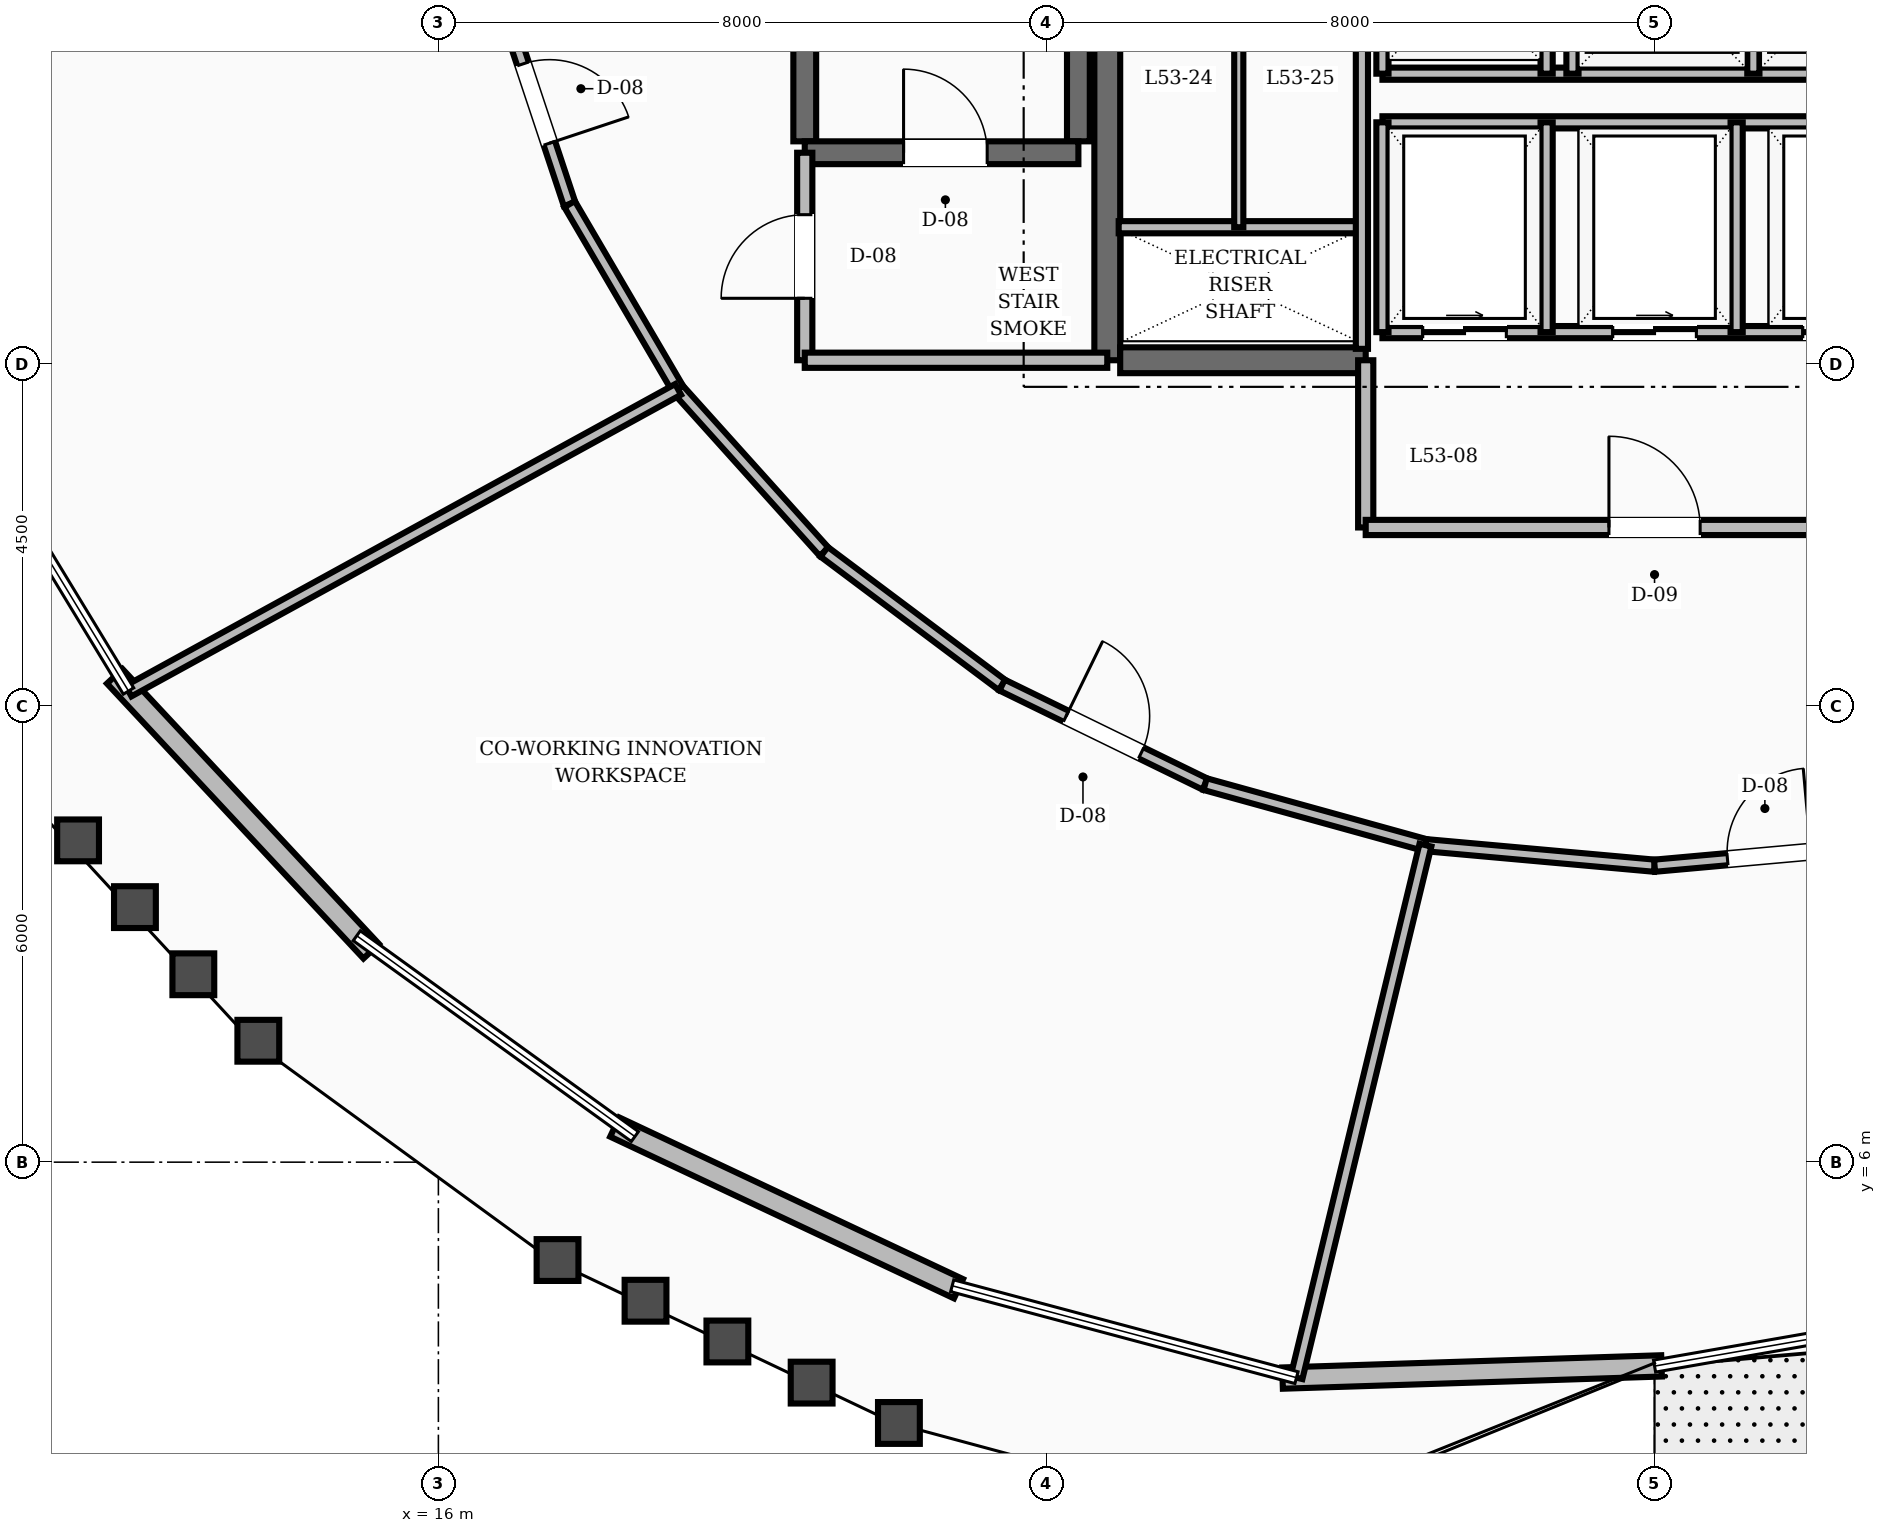
"""IFC4 building model, lengths in metres.
Left out: names, types, materials, properties, quantities, classifications, styles, units other than length and angle.
Written with IfcOpenShell. Run it as: python <this file> out.ifc"""

import sys

from ifc_helpers import new_model, si_unit, direction, frame, frame_2d, origin, place, context, subcontext, project, spatial, rectangle, extrude, element, fill, save


model = new_model("IFC4")
c1 = context("Model", 3, precision=1e-05, world=origin(), true_north=direction((0.0, 1.0)))
c2 = subcontext(c1, "Body", "Model", "MODEL_VIEW")
j1 = project(units=[si_unit("LENGTHUNIT", "METRE"), si_unit("PLANEANGLEUNIT", "RADIAN")], contexts=[c1])
p1 = place(None, origin())
s1 = spatial("IfcSite", under=j1, at=p1, CompositionType="ELEMENT")
p2 = place(p1, origin())
s2 = spatial("IfcBuilding", under=s1, at=p2, CompositionType="ELEMENT")
p3 = place(p2, frame((0.0, 0.0, 203.6)))
s3 = spatial("IfcBuildingStorey", under=s2, at=p3, CompositionType="ELEMENT", Elevation=203.6)
p4 = place(p3, frame((24.8, 16.55, 0.0), z_axis=(0.0, 0.0, 1.0), x_axis=(0.0, 1.0, 0.0)))
e1 = element("IfcWall", 1, at=p4, inside=s3, PredefinedType="SHEAR", context=c2, shape_type="SweptSolid", body=[
    extrude(rectangle(XDim=6.3, YDim=0.34, at=frame_2d((3.15, 0.0))), origin(), (0.0, 0.0, 1.0), 4.8),
])
p5 = place(p3, frame((24.97, 16.55, 0.0), z_axis=(0.0, 0.0, 1.0), x_axis=(1.0, 0.0, 0.0)))
e2 = element("IfcWall", 2, at=p5, inside=s3, PredefinedType="SHEAR", context=c2, shape_type="SweptSolid", body=[
    extrude(rectangle(XDim=3.23, YDim=0.34, at=frame_2d((1.615, 0.0))), origin(), (0.0, 0.0, 1.0), 4.8),
])
for number, where, z_axis, x_axis in (
    (3, (20.82, 19.43, 0.0), (0.0, 0.0, 1.0), (0.0, 1.0, 0.0)),
    (4, (24.42, 19.43, 0.0), (0.0, 0.0, 1.0), (0.0, 1.0, 0.0)),
):
    element("IfcWall", number, at=place(p3, frame(where, z_axis=z_axis, x_axis=x_axis)), inside=s3, PredefinedType="SHEAR", context=c2, shape_type="SweptSolid", body=[
        extrude(rectangle(XDim=8.74, YDim=0.3, at=frame_2d((4.37, 0.0))), origin(), (0.0, 0.0, 1.0), 4.8),
    ])
p6 = place(p3, frame((20.82, 19.28, 0.0), z_axis=(0.0, 0.0, 1.0), x_axis=(1.0, 0.0, 0.0)))
e5 = element("IfcWall", 5, at=p6, inside=s3, PredefinedType="SHEAR", context=c2, shape_type="SweptSolid", body=[
    extrude(rectangle(XDim=3.6, YDim=0.3, at=frame_2d((1.8, 0.0))), origin(), (0.0, 0.0, 1.0), 4.8),
])
p7 = place(p6, frame((1.3, 0.0, 0.0)))
e6 = element("IfcOpeningElement", 6, at=p7, cuts=e5, PredefinedType="OPENING", context=c2, shape_type="SweptSolid", body=[
    extrude(rectangle(XDim=1.1, YDim=2.1, at=frame_2d((0.55, 1.05))), frame((0.0, 0.16, 0.0), z_axis=(0.0, -1.0, 0.0), x_axis=(1.0, 0.0, 0.0)), (0.0, 0.0, 1.0), 0.32),
])
p8 = place(p3, frame((11.742, 12.392, 0.0), z_axis=(0.0, 0.0, 1.0), x_axis=(0.682128325962, -0.731232484864, 0.0)))
e7 = element("IfcWall", 7, at=p8, inside=s3, PredefinedType="STANDARD", context=c2, shape_type="SweptSolid", body=[
    extrude(rectangle(XDim=4.947, YDim=0.28, at=frame_2d((2.474, 0.0))), origin(), (0.0, 0.0, 1.0), 3.71),
])
p9 = place(p3, frame((18.32, 6.462, 0.0), z_axis=(0.0, 0.0, 1.0), x_axis=(0.904923833453, -0.425573560796, 0.0)))
e8 = element("IfcWall", 8, at=p9, inside=s3, PredefinedType="STANDARD", context=c2, shape_type="SweptSolid", body=[
    extrude(rectangle(XDim=4.999, YDim=0.28, at=frame_2d((2.499, 0.0))), origin(), (0.0, 0.0, 1.0), 3.71),
])
p10 = place(p3, frame((27.105, 3.159, 0.0), z_axis=(0.0, 0.0, 1.0), x_axis=(0.999479910851, 0.03224760153, 0.0)))
e9 = element("IfcWall", 9, at=p10, inside=s3, PredefinedType="STANDARD", context=c2, shape_type="SweptSolid", body=[
    extrude(rectangle(XDim=4.989, YDim=0.28, at=frame_2d((2.495, 0.0))), origin(), (0.0, 0.0, 1.0), 3.71),
])
p11 = place(p3, frame((20.82, 16.55, 0.0), z_axis=(0.0, 0.0, 1.0), x_axis=(0.0, 1.0, 0.0)))
e10 = element("IfcWall", 10, at=p11, inside=s3, PredefinedType="SOLIDWALL", context=c2, shape_type="SweptSolid", body=[
    extrude(rectangle(XDim=2.73, YDim=0.2, at=frame_2d((1.365, 0.0))), origin(), (0.0, 0.0, 1.0), 3.71),
])
p12 = place(p11, frame((0.815, 0.0, 0.0)))
e11 = element("IfcOpeningElement", 11, at=p12, cuts=e10, PredefinedType="OPENING", context=c2, shape_type="SweptSolid", body=[
    extrude(rectangle(XDim=1.1, YDim=2.1, at=frame_2d((0.55, 1.05))), frame((0.0, 0.11, 0.0), z_axis=(0.0, -1.0, 0.0), x_axis=(1.0, 0.0, 0.0)), (0.0, 0.0, 1.0), 0.22),
])
p13 = place(p3, frame((20.82, 16.55, 0.0), z_axis=(0.0, 0.0, 1.0), x_axis=(1.0, 0.0, 0.0)))
e12 = element("IfcWall", 12, at=p13, inside=s3, PredefinedType="SOLIDWALL", context=c2, shape_type="SweptSolid", body=[
    extrude(rectangle(XDim=3.98, YDim=0.2, at=frame_2d((1.99, 0.0))), origin(), (0.0, 0.0, 1.0), 3.71),
])
p14 = place(p3, frame((28.2, 14.35, 0.0), z_axis=(0.0, 0.0, 1.0), x_axis=(0.0, 1.0, 0.0)))
e13 = element("IfcWall", 13, at=p14, inside=s3, PredefinedType="SOLIDWALL", context=c2, shape_type="SweptSolid", body=[
    extrude(rectangle(XDim=2.2, YDim=0.2, at=frame_2d((1.1, 0.0))), origin(), (0.0, 0.0, 1.0), 3.71),
])
p15 = place(p3, frame((28.2, 14.35, 0.0), z_axis=(0.0, 0.0, 1.0), x_axis=(1.0, 0.0, 0.0)))
e14 = element("IfcWall", 14, at=p15, inside=s3, PredefinedType="SOLIDWALL", context=c2, shape_type="SweptSolid", body=[
    extrude(rectangle(XDim=7.6, YDim=0.2, at=frame_2d((3.8, 0.0))), origin(), (0.0, 0.0, 1.0), 3.71),
])
p16 = place(p15, frame((3.2, 0.0, 0.0)))
e15 = element("IfcOpeningElement", 15, at=p16, cuts=e14, PredefinedType="OPENING", context=c2, shape_type="SweptSolid", body=[
    extrude(rectangle(XDim=1.2, YDim=2.1, at=frame_2d((0.6, 1.05))), frame((0.0, 0.11, 0.0), z_axis=(0.0, -1.0, 0.0), x_axis=(1.0, 0.0, 0.0)), (0.0, 0.0, 1.0), 0.22),
])
p17 = place(p3, frame((28.42, 20.32, 0.0), z_axis=(0.0, 0.0, 1.0), x_axis=(1.0, 0.0, 0.0)))
e16 = element("IfcWall", 16, at=p17, inside=s3, PredefinedType="SOLIDWALL", context=c2, shape_type="SweptSolid", body=[
    extrude(rectangle(XDim=7.26, YDim=0.16, at=frame_2d((3.63, 0.0))), origin(), (0.0, 0.0, 1.0), 3.71),
])
for number, where, z_axis, x_axis in (
    (17, (28.42, 20.32, 0.0), (0.0, 0.0, 1.0), (0.0, 1.0, 0.0)),
    (18, (30.58, 20.32, 0.0), (0.0, 0.0, 1.0), (0.0, 1.0, 0.0)),
    (19, (30.92, 20.32, 0.0), (0.0, 0.0, 1.0), (0.0, 1.0, 0.0)),
    (20, (33.3, 20.32, 0.0), (0.0, 0.0, 1.0), (0.0, 1.0, 0.0)),
):
    element("IfcWall", number, at=place(p3, frame(where, z_axis=z_axis, x_axis=x_axis)), inside=s3, PredefinedType="SOLIDWALL", context=c2, shape_type="SweptSolid", body=[
        extrude(rectangle(XDim=2.36, YDim=0.16, at=frame_2d((1.18, 0.0))), origin(), (0.0, 0.0, 1.0), 3.71),
    ])
p18 = place(p3, frame((28.42, 16.92, 0.0), z_axis=(0.0, 0.0, 1.0), x_axis=(1.0, 0.0, 0.0)))
e21 = element("IfcWall", 21, at=p18, inside=s3, PredefinedType="SOLIDWALL", context=c2, shape_type="SweptSolid", body=[
    extrude(rectangle(XDim=7.16, YDim=0.16, at=frame_2d((3.58, 0.0))), origin(), (0.0, 0.0, 1.0), 3.71),
])
p19 = place(p18, frame((0.53, 0.0, 0.0)))
e22 = element("IfcOpeningElement", 22, at=p19, cuts=e21, PredefinedType="OPENING", context=c2, shape_type="SweptSolid", body=[
    extrude(rectangle(XDim=1.1, YDim=2.15, at=frame_2d((0.55, 1.075))), frame((0.0, 0.09, 0.0), z_axis=(0.0, -1.0, 0.0), x_axis=(1.0, 0.0, 0.0)), (0.0, 0.0, 1.0), 0.18),
])
p20 = place(p18, frame((3.03, 0.0, 0.0)))
e23 = element("IfcOpeningElement", 23, at=p20, cuts=e21, PredefinedType="OPENING", context=c2, shape_type="SweptSolid", body=[
    extrude(rectangle(XDim=1.1, YDim=2.15, at=frame_2d((0.55, 1.075))), frame((0.0, 0.09, 0.0), z_axis=(0.0, -1.0, 0.0), x_axis=(1.0, 0.0, 0.0)), (0.0, 0.0, 1.0), 0.18),
])
p21 = place(p18, frame((5.53, 0.0, 0.0)))
e24 = element("IfcOpeningElement", 24, at=p21, cuts=e21, PredefinedType="OPENING", context=c2, shape_type="SweptSolid", body=[
    extrude(rectangle(XDim=1.1, YDim=2.15, at=frame_2d((0.55, 1.075))), frame((0.0, 0.09, 0.0), z_axis=(0.0, -1.0, 0.0), x_axis=(1.0, 0.0, 0.0)), (0.0, 0.0, 1.0), 0.18),
])
p22 = place(p3, frame((28.42, 19.68, 0.0), z_axis=(0.0, 0.0, 1.0), x_axis=(1.0, 0.0, 0.0)))
e25 = element("IfcWall", 25, at=p22, inside=s3, PredefinedType="SOLIDWALL", context=c2, shape_type="SweptSolid", body=[
    extrude(rectangle(XDim=7.16, YDim=0.16, at=frame_2d((3.58, 0.0))), origin(), (0.0, 0.0, 1.0), 3.71),
])
for number, where, z_axis, x_axis in (
    (26, (28.42, 16.92, 0.0), (0.0, 0.0, 1.0), (0.0, 1.0, 0.0)),
    (27, (30.58, 16.92, 0.0), (0.0, 0.0, 1.0), (0.0, 1.0, 0.0)),
    (28, (33.08, 16.92, 0.0), (0.0, 0.0, 1.0), (0.0, 1.0, 0.0)),
):
    element("IfcWall", number, at=place(p3, frame(where, z_axis=z_axis, x_axis=x_axis)), inside=s3, PredefinedType="SOLIDWALL", context=c2, shape_type="SweptSolid", body=[
        extrude(rectangle(XDim=2.76, YDim=0.16, at=frame_2d((1.38, 0.0))), origin(), (0.0, 0.0, 1.0), 3.71),
    ])
p23 = place(p3, frame((24.95, 18.3, 0.0), z_axis=(0.0, 0.0, 1.0), x_axis=(1.0, 0.0, 0.0)))
e29 = element("IfcWall", 29, at=p23, inside=s3, PredefinedType="SOLIDWALL", context=c2, shape_type="SweptSolid", body=[
    extrude(rectangle(XDim=3.2, YDim=0.16, at=frame_2d((1.6, 0.0))), origin(), (0.0, 0.0, 1.0), 3.71),
])
p24 = place(p3, frame((28.15, 16.7, 0.0), z_axis=(0.0, 0.0, 1.0), x_axis=(0.0, 1.0, 0.0)))
e30 = element("IfcWall", 30, at=p24, inside=s3, PredefinedType="SOLIDWALL", context=c2, shape_type="SweptSolid", body=[
    extrude(rectangle(XDim=6.05, YDim=0.16, at=frame_2d((3.025, 0.0))), origin(), (0.0, 0.0, 1.0), 3.71),
])
p25 = place(p3, frame((26.53, 18.3, 0.0), z_axis=(0.0, 0.0, 1.0), x_axis=(0.0, 1.0, 0.0)))
e31 = element("IfcWall", 31, at=p25, inside=s3, PredefinedType="PARTITIONING", context=c2, shape_type="SweptSolid", body=[
    extrude(rectangle(XDim=4.45, YDim=0.12, at=frame_2d((2.225, 0.0))), origin(), (0.0, 0.0, 1.0), 3.71),
])
p26 = place(p3, frame((16.847, 21.249, 0.0), z_axis=(0.0, 0.0, 1.0), x_axis=(0.315413058649, -0.948954478589, 0.0)))
e32 = element("IfcWall", 32, at=p26, inside=s3, PredefinedType="SOLIDWALL", context=c2, shape_type="SweptSolid", body=[
    extrude(rectangle(XDim=2.787, YDim=0.16, at=frame_2d((1.394, 0.0))), origin(), (0.0, 0.0, 1.0), 3.71),
])
p27 = place(p26, frame((0.844, 0.0, 0.0)))
e33 = element("IfcOpeningElement", 33, at=p27, cuts=e32, PredefinedType="OPENING", context=c2, shape_type="SweptSolid", body=[
    extrude(rectangle(XDim=1.1, YDim=2.1, at=frame_2d((0.55, 1.05))), frame((0.0, 0.09, 0.0), z_axis=(0.0, -1.0, 0.0), x_axis=(1.0, 0.0, 0.0)), (0.0, 0.0, 1.0), 0.18),
])
p28 = place(p3, frame((17.726, 18.604, 0.0), z_axis=(0.0, 0.0, 1.0), x_axis=(0.505380130961, -0.862896820732, 0.0)))
e34 = element("IfcWall", 34, at=p28, inside=s3, PredefinedType="SOLIDWALL", context=c2, shape_type="SweptSolid", body=[
    extrude(rectangle(XDim=2.825, YDim=0.16, at=frame_2d((1.413, 0.0))), origin(), (0.0, 0.0, 1.0), 3.71),
])
p29 = place(p3, frame((19.154, 16.167, 0.0), z_axis=(0.0, 0.0, 1.0), x_axis=(0.668645478294, -0.743581350194, 0.0)))
e35 = element("IfcWall", 35, at=p29, inside=s3, PredefinedType="SOLIDWALL", context=c2, shape_type="SweptSolid", body=[
    extrude(rectangle(XDim=2.874, YDim=0.16, at=frame_2d((1.437, 0.0))), origin(), (0.0, 0.0, 1.0), 3.71),
])
p30 = place(p3, frame((21.075, 14.03, 0.0), z_axis=(0.0, 0.0, 1.0), x_axis=(0.800420462314, -0.599438973966, 0.0)))
e36 = element("IfcWall", 36, at=p30, inside=s3, PredefinedType="SOLIDWALL", context=c2, shape_type="SweptSolid", body=[
    extrude(rectangle(XDim=2.925, YDim=0.16, at=frame_2d((1.462, 0.0))), origin(), (0.0, 0.0, 1.0), 3.71),
])
p31 = place(p3, frame((23.417, 12.276, 0.0), z_axis=(0.0, 0.0, 1.0), x_axis=(0.898755022802, -0.438451147778, 0.0)))
e37 = element("IfcWall", 37, at=p31, inside=s3, PredefinedType="SOLIDWALL", context=c2, shape_type="SweptSolid", body=[
    extrude(rectangle(XDim=2.972, YDim=0.16, at=frame_2d((1.486, 0.0))), origin(), (0.0, 0.0, 1.0), 3.71),
])
p32 = place(p31, frame((0.936, 0.0, 0.0)))
e38 = element("IfcOpeningElement", 38, at=p32, cuts=e37, PredefinedType="OPENING", context=c2, shape_type="SweptSolid", body=[
    extrude(rectangle(XDim=1.1, YDim=2.1, at=frame_2d((0.55, 1.05))), frame((0.0, 0.09, 0.0), z_axis=(0.0, -1.0, 0.0), x_axis=(1.0, 0.0, 0.0)), (0.0, 0.0, 1.0), 0.18),
])
p33 = place(p3, frame((26.087, 10.973, 0.0), z_axis=(0.0, 0.0, 1.0), x_axis=(0.963743190464, -0.26683152519, 0.0)))
e39 = element("IfcWall", 39, at=p33, inside=s3, PredefinedType="SOLIDWALL", context=c2, shape_type="SweptSolid", body=[
    extrude(rectangle(XDim=3.008, YDim=0.16, at=frame_2d((1.504, 0.0))), origin(), (0.0, 0.0, 1.0), 3.71),
])
p34 = place(p3, frame((28.986, 10.171, 0.0), z_axis=(0.0, 0.0, 1.0), x_axis=(0.995982645158, -0.089546471418, 0.0)))
e40 = element("IfcWall", 40, at=p34, inside=s3, PredefinedType="SOLIDWALL", context=c2, shape_type="SweptSolid", body=[
    extrude(rectangle(XDim=3.026, YDim=0.16, at=frame_2d((1.513, 0.0))), origin(), (0.0, 0.0, 1.0), 3.71),
])
p35 = place(p3, frame((32.0, 9.9, 0.0), z_axis=(0.0, 0.0, 1.0), x_axis=(0.995982645158, 0.089546471418, 0.0)))
e41 = element("IfcWall", 41, at=p35, inside=s3, PredefinedType="SOLIDWALL", context=c2, shape_type="SweptSolid", body=[
    extrude(rectangle(XDim=3.026, YDim=0.16, at=frame_2d((1.513, 0.0))), origin(), (0.0, 0.0, 1.0), 3.71),
])
p36 = place(p35, frame((0.963, 0.0, 0.0)))
e42 = element("IfcOpeningElement", 42, at=p36, cuts=e41, PredefinedType="OPENING", context=c2, shape_type="SweptSolid", body=[
    extrude(rectangle(XDim=1.1, YDim=2.1, at=frame_2d((0.55, 1.05))), frame((0.0, 0.09, 0.0), z_axis=(0.0, -1.0, 0.0), x_axis=(1.0, 0.0, 0.0)), (0.0, 0.0, 1.0), 0.18),
])
p37 = place(p3, frame((19.154, 16.167, 0.0), z_axis=(0.0, 0.0, 1.0), x_axis=(-0.876638041694, -0.481150437862, 0.0)))
e43 = element("IfcWall", 43, at=p37, inside=s3, PredefinedType="SOLIDWALL", context=c2, shape_type="SweptSolid", body=[
    extrude(rectangle(XDim=8.248, YDim=0.16, at=frame_2d((4.124, 0.0))), origin(), (0.0, 0.0, 1.0), 3.71),
])
p38 = place(p3, frame((28.986, 10.171, 0.0), z_axis=(0.0, 0.0, 1.0), x_axis=(-0.235364454403, -0.971907183636, 0.0)))
e44 = element("IfcWall", 44, at=p38, inside=s3, PredefinedType="SOLIDWALL", context=c2, shape_type="SweptSolid", body=[
    extrude(rectangle(XDim=7.208, YDim=0.16, at=frame_2d((3.604, 0.0))), origin(), (0.0, 0.0, 1.0), 3.71),
])
p39 = place(p7, origin())
e45 = element("IfcDoor", 45, at=p39, inside=s3, OperationType="SINGLE_SWING_LEFT", PredefinedType="DOOR", context=c2, shape_type="SweptSolid", body=[
    extrude(rectangle(XDim=1.1, YDim=2.1, at=frame_2d((0.55, 1.05))), frame((0.0, 0.025, 0.0), z_axis=(0.0, -1.0, 0.0), x_axis=(1.0, 0.0, 0.0)), (0.0, 0.0, 1.0), 0.05),
])
fill(e6, e45)
p40 = place(p12, origin())
e46 = element("IfcDoor", 46, at=p40, inside=s3, OperationType="SINGLE_SWING_LEFT", PredefinedType="DOOR", context=c2, shape_type="SweptSolid", body=[
    extrude(rectangle(XDim=1.1, YDim=2.1, at=frame_2d((0.55, 1.05))), frame((0.0, 0.025, 0.0), z_axis=(0.0, -1.0, 0.0), x_axis=(1.0, 0.0, 0.0)), (0.0, 0.0, 1.0), 0.05),
])
fill(e11, e46)
p41 = place(p16, origin())
e47 = element("IfcDoor", 47, at=p41, inside=s3, OperationType="SINGLE_SWING_LEFT", PredefinedType="DOOR", context=c2, shape_type="SweptSolid", body=[
    extrude(rectangle(XDim=1.2, YDim=2.1, at=frame_2d((0.6, 1.05))), frame((0.0, 0.025, 0.0), z_axis=(0.0, -1.0, 0.0), x_axis=(1.0, 0.0, 0.0)), (0.0, 0.0, 1.0), 0.05),
])
fill(e15, e47)
p42 = place(p19, origin())
e48 = element("IfcDoor", 48, at=p42, inside=s3, OperationType="SLIDING_TO_RIGHT", PredefinedType="DOOR", context=c2, shape_type="SweptSolid", body=[
    extrude(rectangle(XDim=1.1, YDim=2.15, at=frame_2d((0.55, 1.075))), frame((0.0, 0.025, 0.0), z_axis=(0.0, -1.0, 0.0), x_axis=(1.0, 0.0, 0.0)), (0.0, 0.0, 1.0), 0.05),
])
fill(e22, e48)
p43 = place(p20, origin())
e49 = element("IfcDoor", 49, at=p43, inside=s3, OperationType="SLIDING_TO_RIGHT", PredefinedType="DOOR", context=c2, shape_type="SweptSolid", body=[
    extrude(rectangle(XDim=1.1, YDim=2.15, at=frame_2d((0.55, 1.075))), frame((0.0, 0.025, 0.0), z_axis=(0.0, -1.0, 0.0), x_axis=(1.0, 0.0, 0.0)), (0.0, 0.0, 1.0), 0.05),
])
fill(e23, e49)
p44 = place(p21, origin())
e50 = element("IfcDoor", 50, at=p44, inside=s3, OperationType="SLIDING_TO_RIGHT", PredefinedType="DOOR", context=c2, shape_type="SweptSolid", body=[
    extrude(rectangle(XDim=1.1, YDim=2.15, at=frame_2d((0.55, 1.075))), frame((0.0, 0.025, 0.0), z_axis=(0.0, -1.0, 0.0), x_axis=(1.0, 0.0, 0.0)), (0.0, 0.0, 1.0), 0.05),
])
fill(e24, e50)
p45 = place(p27, origin())
e51 = element("IfcDoor", 51, at=p45, inside=s3, OperationType="SINGLE_SWING_RIGHT", PredefinedType="DOOR", context=c2, shape_type="SweptSolid", body=[
    extrude(rectangle(XDim=1.1, YDim=2.1, at=frame_2d((0.55, 1.05))), frame((0.0, 0.025, 0.0), z_axis=(0.0, -1.0, 0.0), x_axis=(1.0, 0.0, 0.0)), (0.0, 0.0, 1.0), 0.05),
])
fill(e33, e51)
p46 = place(p32, origin())
e52 = element("IfcDoor", 52, at=p46, inside=s3, OperationType="SINGLE_SWING_LEFT", PredefinedType="DOOR", context=c2, shape_type="SweptSolid", body=[
    extrude(rectangle(XDim=1.1, YDim=2.1, at=frame_2d((0.55, 1.05))), frame((0.0, 0.025, 0.0), z_axis=(0.0, -1.0, 0.0), x_axis=(1.0, 0.0, 0.0)), (0.0, 0.0, 1.0), 0.05),
])
fill(e38, e52)
p47 = place(p36, origin())
e53 = element("IfcDoor", 53, at=p47, inside=s3, OperationType="SINGLE_SWING_RIGHT", PredefinedType="DOOR", context=c2, shape_type="SweptSolid", body=[
    extrude(rectangle(XDim=1.1, YDim=2.1, at=frame_2d((0.55, 1.05))), frame((0.0, 0.025, 0.0), z_axis=(0.0, -1.0, 0.0), x_axis=(1.0, 0.0, 0.0)), (0.0, 0.0, 1.0), 0.05),
])
fill(e42, e53)
save(model, sys.argv[1])
